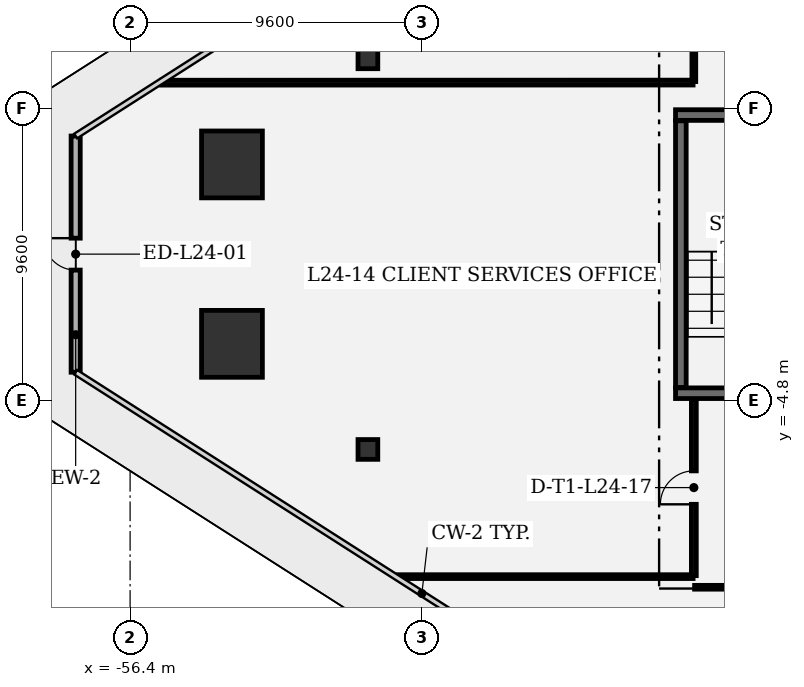
"""IFC4 building model, lengths in metres.
Left out: names, types, materials, properties, quantities, classifications, styles, units other than length and angle.
Written with IfcOpenShell. Run it as: python <this file> out.ifc"""

import sys

from ifc_helpers import new_model, si_unit, direction, frame, frame_2d, origin, origin_2d, place, context, subcontext, project, spatial, rectangle, extrude, element, fill, save


model = new_model("IFC4")
c1 = context("Model", 3, precision=1e-05, world=origin(), true_north=direction((0.0, 1.0)))
c2 = subcontext(c1, "Body", "Model", "MODEL_VIEW")
j1 = project(units=[si_unit("LENGTHUNIT", "METRE"), si_unit("PLANEANGLEUNIT", "RADIAN")], contexts=[c1])
p1 = place(None, origin())
s1 = spatial("IfcSite", under=j1, at=p1, CompositionType="ELEMENT")
p2 = place(p1, origin())
s2 = spatial("IfcBuilding", under=s1, at=p2, CompositionType="ELEMENT")
p3 = place(p2, frame((0.0, 0.0, 109.8)))
s3 = spatial("IfcBuildingStorey", under=s2, at=p3, CompositionType="ELEMENT", Elevation=109.8)
for number, where, z_axis, x_axis in (
    (1, (-53.049, 2.951, 0.0), (0.0, 0.0, 1.0), (1.0, 0.0, 0.0)),
    (2, (-53.049, -2.951, 0.0), (0.0, 0.0, 1.0), (1.0, 0.0, 0.0)),
):
    element("IfcColumn", number, at=place(p3, frame(where, z_axis=z_axis, x_axis=x_axis)), inside=s3, PredefinedType="COLUMN", context=c2, shape_type="SweptSolid", body=[
        extrude(rectangle(XDim=2.0, YDim=2.2, at=origin_2d()), origin(), (0.0, 0.0, 1.0), 4.05),
    ])
for number, where, z_axis, x_axis in (
    (3, (-48.578, 6.425, 0.0), (0.0, 0.0, 1.0), (1.0, 0.0, 0.0)),
    (4, (-48.578, -6.425, 0.0), (0.0, 0.0, 1.0), (1.0, 0.0, 0.0)),
):
    element("IfcColumn", number, at=place(p3, frame(where, z_axis=z_axis, x_axis=x_axis)), inside=s3, PredefinedType="COLUMN", context=c2, shape_type="SweptSolid", body=[
        extrude(rectangle(XDim=0.65, YDim=0.65, at=origin_2d()), origin(), (0.0, 0.0, 1.0), 4.05),
    ])
p4 = place(p3, frame((-58.19, -3.885, 0.0), z_axis=(0.0, 0.0, 1.0), x_axis=(0.0, 1.0, 0.0)))
e5 = element("IfcWall", 5, at=p4, inside=s3, PredefinedType="SOLIDWALL", context=c2, shape_type="SweptSolid", body=[
    extrude(rectangle(XDim=7.77, YDim=0.3, at=frame_2d((3.885, 0.0))), origin(), (0.0, 0.0, 1.0), 3.77),
])
p5 = place(p4, frame((3.36, 0.0, 0.0)))
e6 = element("IfcOpeningElement", 6, at=p5, cuts=e5, PredefinedType="OPENING", context=c2, shape_type="SweptSolid", body=[
    extrude(rectangle(XDim=1.05, YDim=2.2, at=frame_2d((0.525, 1.1))), frame((0.0, 0.16, 0.0), z_axis=(0.0, -1.0, 0.0), x_axis=(1.0, 0.0, 0.0)), (0.0, 0.0, 1.0), 0.32),
])
p6 = place(p3, frame((-38.46, -4.575, 0.0), z_axis=(0.0, 0.0, 1.0), x_axis=(1.0, 0.0, 0.0)))
e7 = element("IfcWall", 7, at=p6, inside=s3, PredefinedType="SHEAR", context=c2, shape_type="SweptSolid", body=[
    extrude(rectangle(XDim=4.21, YDim=0.35, at=frame_2d((2.105, 0.0))), origin(), (0.0, 0.0, 1.0), 3.77),
])
p7 = place(p6, frame((2.39, 0.0, 0.0)))
e8 = element("IfcOpeningElement", 8, at=p7, cuts=e7, PredefinedType="OPENING", context=c2, shape_type="SweptSolid", body=[
    extrude(rectangle(XDim=1.1, YDim=2.2, at=frame_2d((0.55, 1.1))), frame((0.0, 0.185, 0.0), z_axis=(0.0, -1.0, 0.0), x_axis=(1.0, 0.0, 0.0)), (0.0, 0.0, 1.0), 0.37),
])
p8 = place(p3, frame((-34.25, 4.575, 0.0), z_axis=(0.0, 0.0, 1.0), x_axis=(-1.0, 0.0, 0.0)))
e9 = element("IfcWall", 9, at=p8, inside=s3, PredefinedType="SHEAR", context=c2, shape_type="SweptSolid", body=[
    extrude(rectangle(XDim=4.21, YDim=0.35, at=frame_2d((2.105, 0.0))), origin(), (0.0, 0.0, 1.0), 3.77),
])
p9 = place(p3, frame((-38.285, 4.385, 0.0), z_axis=(0.0, 0.0, 1.0), x_axis=(0.0, -1.0, 0.0)))
e10 = element("IfcWall", 10, at=p9, inside=s3, PredefinedType="SHEAR", context=c2, shape_type="SweptSolid", body=[
    extrude(rectangle(XDim=8.77, YDim=0.35, at=frame_2d((4.385, 0.0))), origin(), (0.0, 0.0, 1.0), 3.77),
])
p10 = place(p3, frame((-34.683, -10.958, 0.0), z_axis=(0.0, 0.0, 1.0), x_axis=(-1.0, 0.0, 0.0)))
e11 = element("IfcWall", 11, at=p10, inside=s3, PredefinedType="PARTITIONING", context=c2, shape_type="SweptSolid", body=[
    extrude(rectangle(XDim=3.15, YDim=0.125, at=frame_2d((1.575, 0.0))), origin(), (0.0, 0.0, 1.0), 3.334),
])
p11 = place(p10, frame((1.1, 0.0, 0.0)))
e12 = element("IfcOpeningElement", 12, at=p11, cuts=e11, PredefinedType="OPENING", context=c2, shape_type="SweptSolid", body=[
    extrude(rectangle(XDim=0.95, YDim=2.15, at=frame_2d((0.475, 1.075))), frame((0.0, 0.073, 0.0), z_axis=(0.0, -1.0, 0.0), x_axis=(1.0, 0.0, 0.0)), (0.0, 0.0, 1.0), 0.145),
])
p12 = place(p3, frame((-37.883, -10.608, 0.0), z_axis=(0.0, 0.0, 1.0), x_axis=(-1.0, 0.0, 0.0)))
e13 = element("IfcWall", 13, at=p12, inside=s3, PredefinedType="PARTITIONING", context=c2, shape_type="SweptSolid", body=[
    extrude(rectangle(XDim=9.708, YDim=0.125, at=frame_2d((4.854, 0.0))), origin(), (0.0, 0.0, 1.0), 2.89),
])
p13 = place(p3, frame((-37.858, -10.576, 0.0), z_axis=(0.0, 0.0, 1.0), x_axis=(0.0, 1.0, 0.0)))
e14 = element("IfcWall", 14, at=p13, inside=s3, PredefinedType="PARTITIONING", context=c2, shape_type="SweptSolid", body=[
    extrude(rectangle(XDim=5.792, YDim=0.16, at=frame_2d((2.896, 0.0))), origin(), (0.0, 0.0, 1.0), 3.77),
])
p14 = place(p13, frame((2.346, 0.0, 0.0)))
e15 = element("IfcOpeningElement", 15, at=p14, cuts=e14, PredefinedType="OPENING", context=c2, shape_type="SweptSolid", body=[
    extrude(rectangle(XDim=1.1, YDim=2.15, at=frame_2d((0.55, 1.075))), frame((0.0, 0.09, 0.0), z_axis=(0.0, -1.0, 0.0), x_axis=(1.0, 0.0, 0.0)), (0.0, 0.0, 1.0), 0.18),
])
p15 = place(p3, frame((-37.883, 5.643, 0.0), z_axis=(0.0, 0.0, 1.0), x_axis=(-0.99999998352, -0.000181549029, 0.0)))
e16 = element("IfcWall", 16, at=p15, inside=s3, PredefinedType="PARTITIONING", context=c2, shape_type="SweptSolid", body=[
    extrude(rectangle(XDim=17.482, YDim=0.16, at=frame_2d((8.741, 0.0))), origin(), (0.0, 0.0, 1.0), 2.89),
])
p16 = place(p3, frame((-37.858, 5.676, 0.0), z_axis=(0.0, 0.0, 1.0), x_axis=(0.0, 1.0, 0.0)))
e17 = element("IfcWall", 17, at=p16, inside=s3, PredefinedType="PARTITIONING", context=c2, shape_type="SweptSolid", body=[
    extrude(rectangle(XDim=5.057, YDim=0.125, at=frame_2d((2.529, 0.0))), origin(), (0.0, 0.0, 1.0), 3.77),
])
p17 = place(p16, frame((2.054, 0.0, 0.0)))
e18 = element("IfcOpeningElement", 18, at=p17, cuts=e17, PredefinedType="OPENING", context=c2, shape_type="SweptSolid", body=[
    extrude(rectangle(XDim=0.95, YDim=2.15, at=frame_2d((0.475, 1.075))), frame((0.0, 0.073, 0.0), z_axis=(0.0, -1.0, 0.0), x_axis=(1.0, 0.0, 0.0)), (0.0, 0.0, 1.0), 0.145),
])
p18 = place(p5, origin())
e19 = element("IfcDoor", 19, at=p18, inside=s3, OperationType="SINGLE_SWING_RIGHT", PredefinedType="DOOR", context=c2, shape_type="SweptSolid", body=[
    extrude(rectangle(XDim=1.05, YDim=2.2, at=frame_2d((0.525, 1.1))), frame((0.0, 0.025, 0.0), z_axis=(0.0, -1.0, 0.0), x_axis=(1.0, 0.0, 0.0)), (0.0, 0.0, 1.0), 0.05),
])
fill(e6, e19)
p19 = place(p14, origin())
e20 = element("IfcDoor", 20, at=p19, inside=s3, OperationType="SINGLE_SWING_LEFT", PredefinedType="DOOR", context=c2, shape_type="SweptSolid", body=[
    extrude(rectangle(XDim=1.1, YDim=2.15, at=frame_2d((0.55, 1.075))), frame((0.0, 0.025, 0.0), z_axis=(0.0, -1.0, 0.0), x_axis=(1.0, 0.0, 0.0)), (0.0, 0.0, 1.0), 0.05),
])
fill(e15, e20)
save(model, sys.argv[1])
